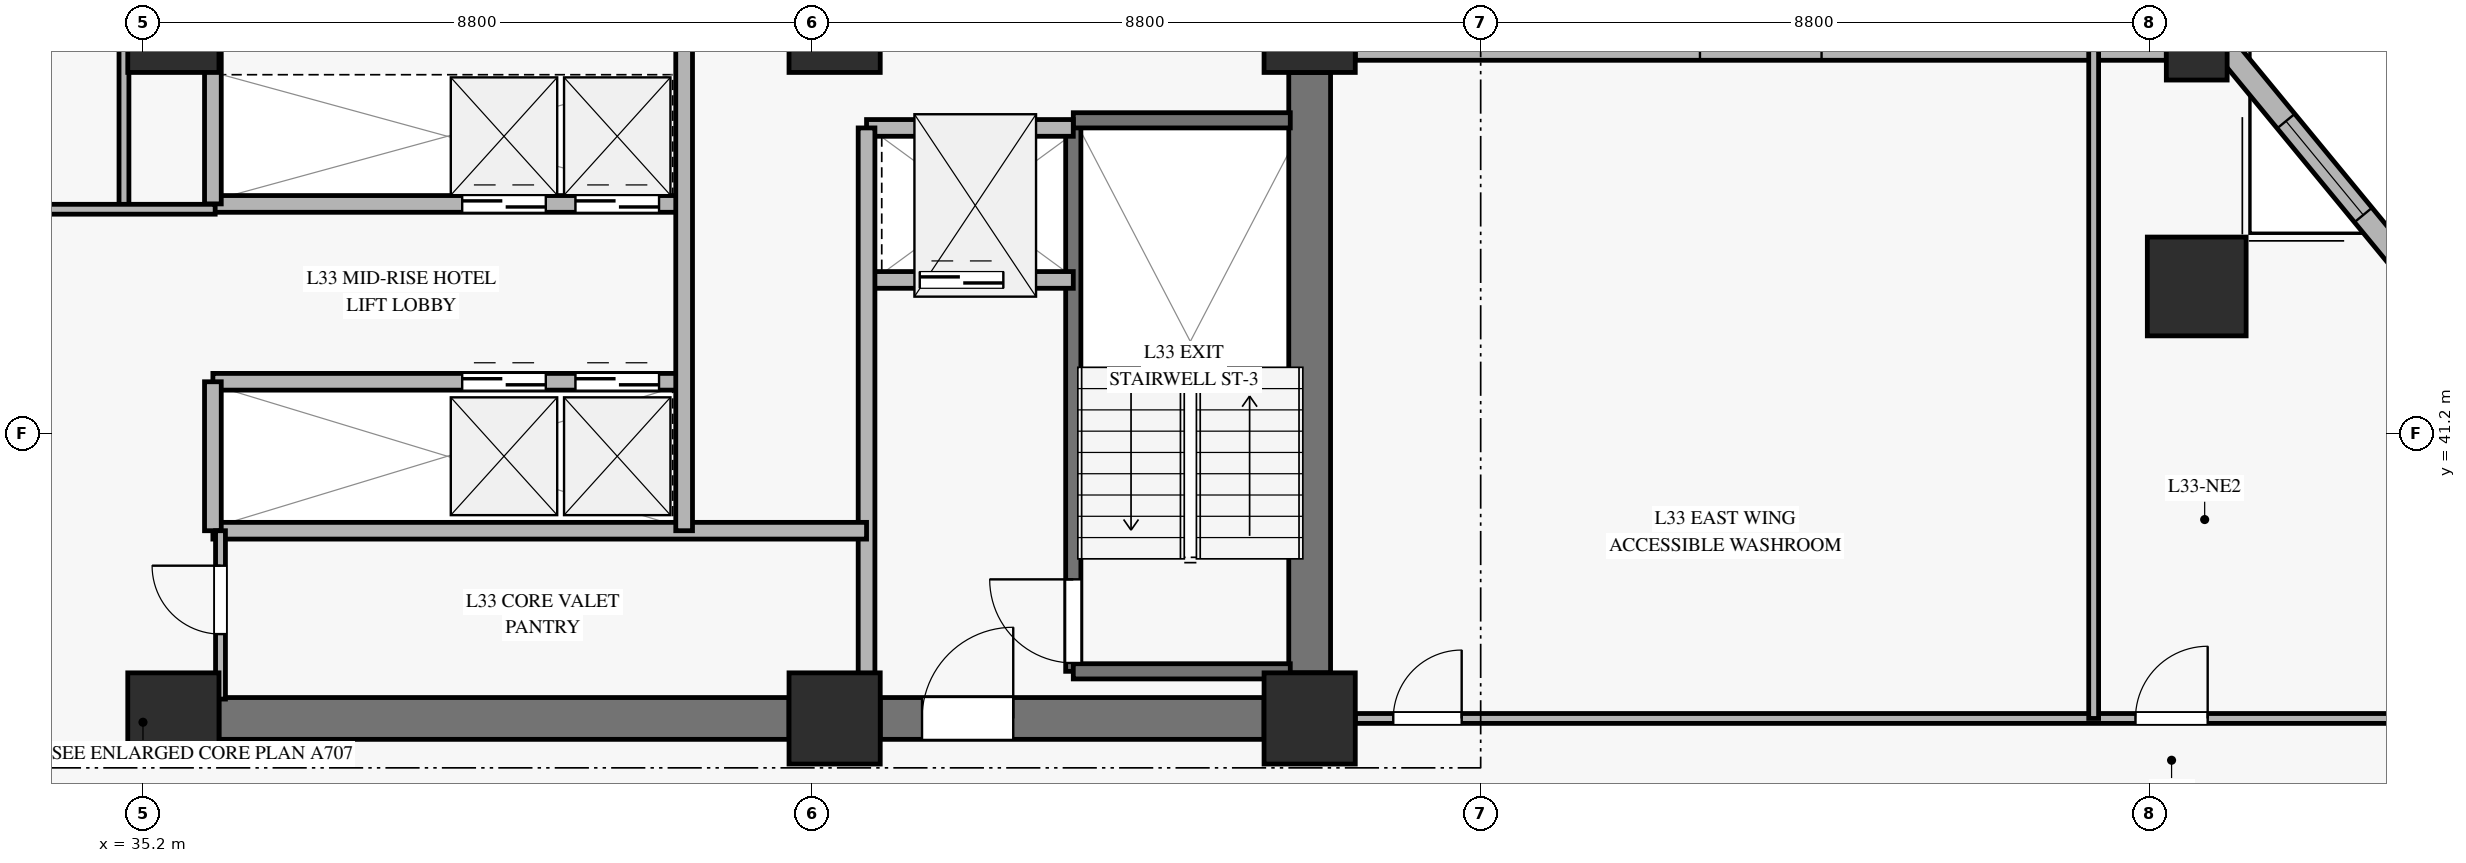
"""IFC4 building model, lengths in metres.
Left out: names, types, materials, properties, quantities, classifications, styles, units other than length and angle.
Written with IfcOpenShell. Run it as: python <this file> out.ifc"""

import sys

from ifc_helpers import new_model, si_unit, direction, frame, frame_2d, origin, origin_2d, place, context, subcontext, project, spatial, rectangle, hollow_rectangle, extrude, source, transform, mapped, element, fill, save


model = new_model("IFC4")
c1 = context("Model", 3, precision=1e-05, world=origin(), true_north=direction((0.0, 1.0)))
c2 = subcontext(c1, "Body", "Model", "MODEL_VIEW")
j1 = project(units=[si_unit("LENGTHUNIT", "METRE"), si_unit("PLANEANGLEUNIT", "RADIAN")], contexts=[c1])
p1 = place(None, origin())
s1 = spatial("IfcSite", under=j1, at=p1, CompositionType="ELEMENT")
p2 = place(p1, origin())
s2 = spatial("IfcBuilding", under=s1, at=p2, CompositionType="ELEMENT")
p3 = place(p2, frame((0.0, 0.0, 137.7)))
s3 = spatial("IfcBuildingStorey", under=s2, at=p3, CompositionType="ELEMENT", Elevation=137.7)
m1 = source(origin(), c2, "Body", "SweptSolid", [
    extrude(rectangle(XDim=1.2, YDim=1.2, at=origin_2d()), origin(), (0.0, 0.0, 1.0), 3.27),
])
for number, where, z_axis, x_axis in (
    (1, (35.6, 37.45, 0.0), (0.0, 0.0, 1.0), (1.0, 0.0, 0.0)),
    (2, (35.6, 46.55, 0.0), (0.0, 0.0, 1.0), (1.0, 0.0, 0.0)),
    (3, (44.3, 37.45, 0.0), (0.0, 0.0, 1.0), (1.0, 0.0, 0.0)),
    (4, (44.3, 46.55, 0.0), (0.0, 0.0, 1.0), (1.0, 0.0, 0.0)),
    (5, (50.55, 37.45, 0.0), (0.0, 0.0, 1.0), (1.0, 0.0, 0.0)),
    (6, (50.55, 46.55, 0.0), (0.0, 0.0, 1.0), (1.0, 0.0, 0.0)),
):
    element("IfcColumn", number, at=place(p3, frame(where, z_axis=z_axis, x_axis=x_axis)), inside=s3, PredefinedType="PILASTER", context=c2, shape_type="MappedRepresentation", body=[
        mapped(m1, transform((0.0, 0.0, 0.0), x_axis=(1.0, 0.0, 0.0), y_axis=(0.0, 1.0, 0.0), z_axis=(0.0, 0.0, 1.0), scale=1.0)),
    ])
p4 = place(p3, frame((36.2, 37.45, 0.0), z_axis=(0.0, 0.0, 1.0), x_axis=(1.0, 0.0, 0.0)))
e7 = element("IfcWall", 7, at=p4, inside=s3, PredefinedType="SHEAR", context=c2, shape_type="SweptSolid", body=[
    extrude(rectangle(XDim=7.5, YDim=0.55, at=frame_2d((3.75, 0.0))), origin(), (0.0, 0.0, 1.0), 3.27),
])
p5 = place(p3, frame((44.9, 37.45, 0.0), z_axis=(0.0, 0.0, 1.0), x_axis=(1.0, 0.0, 0.0)))
e8 = element("IfcWall", 8, at=p5, inside=s3, PredefinedType="SHEAR", context=c2, shape_type="SweptSolid", body=[
    extrude(rectangle(XDim=5.05, YDim=0.55, at=frame_2d((2.525, 0.0))), origin(), (0.0, 0.0, 1.0), 3.27),
])
p6 = place(p5, frame((0.55, 0.0, 0.0)))
e9 = element("IfcOpeningElement", 9, at=p6, cuts=e8, PredefinedType="OPENING", context=c2, shape_type="SweptSolid", body=[
    extrude(rectangle(XDim=1.2, YDim=2.15, at=frame_2d((0.6, 1.075))), frame((0.0, 0.285, 0.0), z_axis=(0.0, -1.0, 0.0), x_axis=(1.0, 0.0, 0.0)), (0.0, 0.0, 1.0), 0.57),
])
p7 = place(p3, frame((50.55, 38.05, 0.0), z_axis=(0.0, 0.0, 1.0), x_axis=(0.0, 1.0, 0.0)))
e10 = element("IfcWall", 10, at=p7, inside=s3, PredefinedType="SHEAR", context=c2, shape_type="SweptSolid", body=[
    extrude(rectangle(XDim=7.9, YDim=0.55, at=frame_2d((3.95, 0.0))), origin(), (0.0, 0.0, 1.0), 3.27),
])
m2 = source(origin(), c2, "Body", "SweptSolid", [
    extrude(hollow_rectangle(XDim=1.3, YDim=1.3, WallThickness=0.06, at=origin_2d()), origin(), (0.0, 0.0, 1.0), 3.27),
])
p8 = place(p3, frame((62.221, 43.134, 0.0), z_axis=(0.0, 0.0, 1.0), x_axis=(1.0, 0.0, 0.0)))
e11 = element("IfcColumn", 11, at=p8, inside=s3, PredefinedType="COLUMN", context=c2, shape_type="MappedRepresentation", body=[
    mapped(m2, transform((0.0, 0.0, 0.0), x_axis=(1.0, 0.0, 0.0), y_axis=(0.0, 1.0, 0.0), z_axis=(0.0, 0.0, 1.0), scale=1.0)),
])
m3 = source(origin(), c2, "Body", "SweptSolid", [
    extrude(hollow_rectangle(XDim=0.8, YDim=0.8, WallThickness=0.036, at=origin_2d()), origin(), (0.0, 0.0, 1.0), 3.27),
])
p9 = place(p3, frame((62.221, 46.25, 0.0), z_axis=(0.0, 0.0, 1.0), x_axis=(1.0, 0.0, 0.0)))
e12 = element("IfcColumn", 12, at=p9, inside=s3, PredefinedType="COLUMN", context=c2, shape_type="MappedRepresentation", body=[
    mapped(m3, transform((0.0, 0.0, 0.0), x_axis=(1.0, 0.0, 0.0), y_axis=(0.0, 1.0, 0.0), z_axis=(0.0, 0.0, 1.0), scale=1.0)),
])
p10 = place(p3, frame((51.15, 46.25, 0.0), z_axis=(0.0, 0.0, 1.0), x_axis=(1.0, 0.0, 0.0)))
e13 = element("IfcWall", 13, at=p10, inside=s3, PredefinedType="SOLIDWALL", context=c2, shape_type="SweptSolid", body=[
    extrude(rectangle(XDim=10.671, YDim=0.28, at=frame_2d((5.335, 0.0))), origin(), (0.0, 0.0, 1.0), 2.75),
])
p11 = place(p10, frame((4.535, 0.0, 0.45)))
e14 = element("IfcOpeningElement", 14, at=p11, cuts=e13, PredefinedType="OPENING", context=c2, shape_type="SweptSolid", body=[
    extrude(rectangle(XDim=1.6, YDim=2.0, at=frame_2d((0.8, 1.0))), frame((0.0, 0.15, 0.0), z_axis=(0.0, -1.0, 0.0), x_axis=(1.0, 0.0, 0.0)), (0.0, 0.0, 1.0), 0.3),
])
p12 = place(p3, frame((65.186, 43.134, 0.0), z_axis=(0.0, 0.0, 1.0), x_axis=(-0.63553760815, 0.772069911748, 0.0)))
e15 = element("IfcWall", 15, at=p12, inside=s3, PredefinedType="SOLIDWALL", context=c2, shape_type="SweptSolid", body=[
    extrude(rectangle(XDim=4.036, YDim=0.3, at=frame_2d((2.018, 0.0))), origin(), (0.0, 0.0, 1.0), 2.75),
])
p13 = place(p12, frame((1.218, 0.0, 0.45)))
e16 = element("IfcOpeningElement", 16, at=p13, cuts=e15, PredefinedType="OPENING", context=c2, shape_type="SweptSolid", body=[
    extrude(rectangle(XDim=1.6, YDim=2.0, at=frame_2d((0.8, 1.0))), frame((0.0, 0.16, 0.0), z_axis=(0.0, -1.0, 0.0), x_axis=(1.0, 0.0, 0.0)), (0.0, 0.0, 1.0), 0.32),
])
p14 = place(p3, frame((47.44, 38.07, 0.0), z_axis=(0.0, 0.0, 1.0), x_axis=(0.0, 1.0, 0.0)))
e17 = element("IfcWall", 17, at=p14, inside=s3, PredefinedType="SOLIDWALL", context=c2, shape_type="SweptSolid", body=[
    extrude(rectangle(XDim=7.25, YDim=0.2, at=frame_2d((3.625, 0.0))), origin(), (0.0, 0.0, 1.0), 3.5),
])
p15 = place(p14, frame((0.11, 0.0, 0.0)))
e18 = element("IfcOpeningElement", 18, at=p15, cuts=e17, PredefinedType="OPENING", context=c2, shape_type="SweptSolid", body=[
    extrude(rectangle(XDim=1.1, YDim=2.15, at=frame_2d((0.55, 1.075))), frame((0.0, 0.11, 0.0), z_axis=(0.0, -1.0, 0.0), x_axis=(1.0, 0.0, 0.0)), (0.0, 0.0, 1.0), 0.22),
])
for number, where, z_axis, x_axis in (
    (19, (47.44, 45.32, 0.0), (0.0, 0.0, 1.0), (1.0, 0.0, 0.0)),
    (20, (47.44, 38.07, 0.0), (0.0, 0.0, 1.0), (1.0, 0.0, 0.0)),
):
    element("IfcWall", number, at=place(p3, frame(where, z_axis=z_axis, x_axis=x_axis)), inside=s3, PredefinedType="SOLIDWALL", context=c2, shape_type="SweptSolid", body=[
        extrude(rectangle(XDim=2.855, YDim=0.2, at=frame_2d((1.427, 0.0))), origin(), (0.0, 0.0, 1.0), 3.5),
    ])
p16 = place(p3, frame((44.72, 43.22, 0.0), z_axis=(0.0, 0.0, 1.0), x_axis=(1.0, 0.0, 0.0)))
e21 = element("IfcWall", 21, at=p16, inside=s3, PredefinedType="SOLIDWALL", context=c2, shape_type="SweptSolid", body=[
    extrude(rectangle(XDim=2.72, YDim=0.22, at=frame_2d((1.36, 0.0))), origin(), (0.0, 0.0, 1.0), 3.27),
])
p17 = place(p16, frame((0.7, 0.0, 0.0)))
e22 = element("IfcOpeningElement", 22, at=p17, cuts=e21, PredefinedType="OPENING", context=c2, shape_type="SweptSolid", body=[
    extrude(rectangle(XDim=1.1, YDim=2.2, at=frame_2d((0.55, 1.1))), frame((0.0, 0.12, 0.0), z_axis=(0.0, -1.0, 0.0), x_axis=(1.0, 0.0, 0.0)), (0.0, 0.0, 1.0), 0.24),
])
p18 = place(p3, frame((44.72, 45.22, 0.0), z_axis=(0.0, 0.0, 1.0), x_axis=(1.0, 0.0, 0.0)))
e23 = element("IfcWall", 23, at=p18, inside=s3, PredefinedType="SOLIDWALL", context=c2, shape_type="SweptSolid", body=[
    extrude(rectangle(XDim=2.72, YDim=0.22, at=frame_2d((1.36, 0.0))), origin(), (0.0, 0.0, 1.0), 3.27),
])
p19 = place(p3, frame((44.72, 37.705, 0.0), z_axis=(0.0, 0.0, 1.0), x_axis=(0.0, 1.0, 0.0)))
e24 = element("IfcWall", 24, at=p19, inside=s3, PredefinedType="SOLIDWALL", context=c2, shape_type="SweptSolid", body=[
    extrude(rectangle(XDim=7.515, YDim=0.22, at=frame_2d((3.757, 0.0))), origin(), (0.0, 0.0, 1.0), 3.27),
])
p20 = place(p3, frame((36.12, 44.22, 0.0), z_axis=(0.0, 0.0, 1.0), x_axis=(1.0, 0.0, 0.0)))
e25 = element("IfcWall", 25, at=p20, inside=s3, PredefinedType="SOLIDWALL", context=c2, shape_type="SweptSolid", body=[
    extrude(rectangle(XDim=6.2, YDim=0.22, at=frame_2d((3.1, 0.0))), origin(), (0.0, 0.0, 1.0), 3.27),
])
p21 = place(p20, frame((3.28, 0.0, 0.0)))
e26 = element("IfcOpeningElement", 26, at=p21, cuts=e25, PredefinedType="OPENING", context=c2, shape_type="SweptSolid", body=[
    extrude(rectangle(XDim=1.1, YDim=2.2, at=frame_2d((0.55, 1.1))), frame((0.0, 0.12, 0.0), z_axis=(0.0, -1.0, 0.0), x_axis=(1.0, 0.0, 0.0)), (0.0, 0.0, 1.0), 0.24),
])
p22 = place(p20, frame((4.77, 0.0, 0.0)))
e27 = element("IfcOpeningElement", 27, at=p22, cuts=e25, PredefinedType="OPENING", context=c2, shape_type="SweptSolid", body=[
    extrude(rectangle(XDim=1.1, YDim=2.2, at=frame_2d((0.55, 1.1))), frame((0.0, 0.12, 0.0), z_axis=(0.0, -1.0, 0.0), x_axis=(1.0, 0.0, 0.0)), (0.0, 0.0, 1.0), 0.24),
])
p23 = place(p3, frame((36.12, 41.88, 0.0), z_axis=(0.0, 0.0, 1.0), x_axis=(1.0, 0.0, 0.0)))
e28 = element("IfcWall", 28, at=p23, inside=s3, PredefinedType="SOLIDWALL", context=c2, shape_type="SweptSolid", body=[
    extrude(rectangle(XDim=6.2, YDim=0.22, at=frame_2d((3.1, 0.0))), origin(), (0.0, 0.0, 1.0), 3.27),
])
p24 = place(p23, frame((3.28, 0.0, 0.0)))
e29 = element("IfcOpeningElement", 29, at=p24, cuts=e28, PredefinedType="OPENING", context=c2, shape_type="SweptSolid", body=[
    extrude(rectangle(XDim=1.1, YDim=2.2, at=frame_2d((0.55, 1.1))), frame((0.0, 0.12, 0.0), z_axis=(0.0, -1.0, 0.0), x_axis=(1.0, 0.0, 0.0)), (0.0, 0.0, 1.0), 0.24),
])
p25 = place(p23, frame((4.77, 0.0, 0.0)))
e30 = element("IfcOpeningElement", 30, at=p25, cuts=e28, PredefinedType="OPENING", context=c2, shape_type="SweptSolid", body=[
    extrude(rectangle(XDim=1.1, YDim=2.2, at=frame_2d((0.55, 1.1))), frame((0.0, 0.12, 0.0), z_axis=(0.0, -1.0, 0.0), x_axis=(1.0, 0.0, 0.0)), (0.0, 0.0, 1.0), 0.24),
])
p26 = place(p3, frame((36.12, 39.92, 0.0), z_axis=(0.0, 0.0, 1.0), x_axis=(1.0, 0.0, 0.0)))
e31 = element("IfcWall", 31, at=p26, inside=s3, PredefinedType="SOLIDWALL", context=c2, shape_type="SweptSolid", body=[
    extrude(rectangle(XDim=8.6, YDim=0.22, at=frame_2d((4.3, 0.0))), origin(), (0.0, 0.0, 1.0), 2.555),
])
p27 = place(p3, frame((42.32, 39.92, 0.0), z_axis=(0.0, 0.0, 1.0), x_axis=(0.0, 1.0, 0.0)))
e32 = element("IfcWall", 32, at=p27, inside=s3, PredefinedType="SOLIDWALL", context=c2, shape_type="SweptSolid", body=[
    extrude(rectangle(XDim=6.375, YDim=0.22, at=frame_2d((3.188, 0.0))), origin(), (0.0, 0.0, 1.0), 3.27),
])
p28 = place(p3, frame((36.12, 39.92, 0.0), z_axis=(0.0, 0.0, 1.0), x_axis=(0.0, 1.0, 0.0)))
e33 = element("IfcWall", 33, at=p28, inside=s3, PredefinedType="SOLIDWALL", context=c2, shape_type="SweptSolid", body=[
    extrude(rectangle(XDim=1.96, YDim=0.22, at=frame_2d((0.98, 0.0))), origin(), (0.0, 0.0, 1.0), 3.27),
])
p29 = place(p3, frame((36.12, 44.22, 0.0), z_axis=(0.0, 0.0, 1.0), x_axis=(0.0, 1.0, 0.0)))
e34 = element("IfcWall", 34, at=p29, inside=s3, PredefinedType="SOLIDWALL", context=c2, shape_type="SweptSolid", body=[
    extrude(rectangle(XDim=2.075, YDim=0.22, at=frame_2d((1.038, 0.0))), origin(), (0.0, 0.0, 1.0), 3.27),
])
p30 = place(p3, frame((34.95, 44.15, 0.0), z_axis=(0.0, 0.0, 1.0), x_axis=(0.0, 1.0, 0.0)))
e35 = element("IfcWall", 35, at=p30, inside=s3, PredefinedType="PARTITIONING", context=c2, shape_type="SweptSolid", body=[
    extrude(rectangle(XDim=2.145, YDim=0.13, at=frame_2d((1.073, 0.0))), origin(), (0.0, 0.0, 1.0), 3.27),
])
p31 = place(p3, frame((33.18, 44.15, 0.0), z_axis=(0.0, 0.0, 1.0), x_axis=(1.0, 0.0, 0.0)))
e36 = element("IfcWall", 36, at=p31, inside=s3, PredefinedType="PARTITIONING", context=c2, shape_type="SweptSolid", body=[
    extrude(rectangle(XDim=2.97, YDim=0.13, at=frame_2d((1.485, 0.0))), origin(), (0.0, 0.0, 1.0), 2.555),
])
p32 = place(p3, frame((36.22, 37.705, 0.0), z_axis=(0.0, 0.0, 1.0), x_axis=(0.0, 1.0, 0.0)))
e37 = element("IfcWall", 37, at=p32, inside=s3, PredefinedType="PARTITIONING", context=c2, shape_type="SweptSolid", body=[
    extrude(rectangle(XDim=2.215, YDim=0.13, at=frame_2d((1.107, 0.0))), origin(), (0.0, 0.0, 1.0), 3.27),
])
p33 = place(p32, frame((0.855, 0.0, 0.0)))
e38 = element("IfcOpeningElement", 38, at=p33, cuts=e37, PredefinedType="OPENING", context=c2, shape_type="SweptSolid", body=[
    extrude(rectangle(XDim=0.9, YDim=2.1, at=frame_2d((0.45, 1.05))), frame((0.0, 0.075, 0.0), z_axis=(0.0, -1.0, 0.0), x_axis=(1.0, 0.0, 0.0)), (0.0, 0.0, 1.0), 0.15),
])
p34 = place(p3, frame((51.15, 37.45, 0.0), z_axis=(0.0, 0.0, 1.0), x_axis=(1.0, 0.0, 0.0)))
e39 = element("IfcWall", 39, at=p34, inside=s3, PredefinedType="PARTITIONING", context=c2, shape_type="SweptSolid", body=[
    extrude(rectangle(XDim=14.036, YDim=0.13, at=frame_2d((7.018, 0.0))), origin(), (0.0, 0.0, 1.0), 2.755),
])
p35 = place(p34, frame((0.5, 0.0, 0.0)))
e40 = element("IfcOpeningElement", 40, at=p35, cuts=e39, PredefinedType="OPENING", context=c2, shape_type="SweptSolid", body=[
    extrude(rectangle(XDim=0.9, YDim=2.1, at=frame_2d((0.45, 1.05))), frame((0.0, 0.075, 0.0), z_axis=(0.0, -1.0, 0.0), x_axis=(1.0, 0.0, 0.0)), (0.0, 0.0, 1.0), 0.15),
])
p36 = place(p34, frame((10.265, 0.0, 0.0)))
e41 = element("IfcOpeningElement", 41, at=p36, cuts=e39, PredefinedType="OPENING", context=c2, shape_type="SweptSolid", body=[
    extrude(rectangle(XDim=0.95, YDim=2.1, at=frame_2d((0.475, 1.05))), frame((0.0, 0.075, 0.0), z_axis=(0.0, -1.0, 0.0), x_axis=(1.0, 0.0, 0.0)), (0.0, 0.0, 1.0), 0.15),
])
p37 = place(p3, frame((60.865, 37.45, 0.0), z_axis=(0.0, 0.0, 1.0), x_axis=(0.0, 1.0, 0.0)))
e42 = element("IfcWall", 42, at=p37, inside=s3, PredefinedType="PARTITIONING", context=c2, shape_type="SweptSolid", body=[
    extrude(rectangle(XDim=8.8, YDim=0.13, at=frame_2d((4.4, 0.0))), origin(), (0.0, 0.0, 1.0), 3.27),
])
m4 = source(origin(), c2, "Body", "SweptSolid", [
    extrude(rectangle(XDim=1.6, YDim=2.0, at=frame_2d((0.8, 1.0))), frame((0.0, 0.03, 0.0), z_axis=(0.0, -1.0, 0.0), x_axis=(1.0, 0.0, 0.0)), (0.0, 0.0, 1.0), 0.06),
])
p38 = place(p13, origin())
e43 = element("IfcWindow", 43, at=p38, inside=s3, PartitioningType="SINGLE_PANEL", PredefinedType="WINDOW", context=c2, shape_type="MappedRepresentation", body=[
    mapped(m4, transform((0.0, 0.0, 0.0), x_axis=(1.0, 0.0, 0.0), y_axis=(0.0, 1.0, 0.0), z_axis=(0.0, 0.0, 1.0), scale=1.0)),
])
fill(e16, e43)
m5 = source(origin(), c2, "Body", "SweptSolid", [
    extrude(rectangle(XDim=1.1, YDim=2.15, at=frame_2d((0.55, 1.075))), frame((0.0, 0.025, 0.0), z_axis=(0.0, -1.0, 0.0), x_axis=(1.0, 0.0, 0.0)), (0.0, 0.0, 1.0), 0.05),
])
p39 = place(p15, origin())
e44 = element("IfcDoor", 44, at=p39, inside=s3, OperationType="SINGLE_SWING_RIGHT", PredefinedType="DOOR", context=c2, shape_type="MappedRepresentation", body=[
    mapped(m5, transform((0.0, 0.0, 0.0), x_axis=(1.0, 0.0, 0.0), y_axis=(0.0, 1.0, 0.0), z_axis=(0.0, 0.0, 1.0), scale=1.0)),
])
fill(e18, e44)
m6 = source(origin(), c2, "Body", "SweptSolid", [
    extrude(rectangle(XDim=1.1, YDim=2.2, at=frame_2d((0.55, 1.1))), frame((0.0, 0.025, 0.0), z_axis=(0.0, -1.0, 0.0), x_axis=(1.0, 0.0, 0.0)), (0.0, 0.0, 1.0), 0.05),
])
p40 = place(p17, origin())
e45 = element("IfcDoor", 45, at=p40, inside=s3, OperationType="SLIDING_TO_LEFT", PredefinedType="DOOR", context=c2, shape_type="MappedRepresentation", body=[
    mapped(m6, transform((0.0, 0.0, 0.0), x_axis=(1.0, 0.0, 0.0), y_axis=(0.0, 1.0, 0.0), z_axis=(0.0, 0.0, 1.0), scale=1.0)),
])
fill(e22, e45)
m7 = source(origin(), c2, "Body", "SweptSolid", [
    extrude(rectangle(XDim=1.2, YDim=2.15, at=frame_2d((0.6, 1.075))), frame((0.0, 0.025, 0.0), z_axis=(0.0, -1.0, 0.0), x_axis=(1.0, 0.0, 0.0)), (0.0, 0.0, 1.0), 0.05),
])
p41 = place(p6, origin())
e46 = element("IfcDoor", 46, at=p41, inside=s3, OperationType="SINGLE_SWING_RIGHT", PredefinedType="DOOR", context=c2, shape_type="MappedRepresentation", body=[
    mapped(m7, transform((0.0, 0.0, 0.0), x_axis=(1.0, 0.0, 0.0), y_axis=(0.0, 1.0, 0.0), z_axis=(0.0, 0.0, 1.0), scale=1.0)),
])
fill(e9, e46)
p42 = place(p21, origin())
e47 = element("IfcDoor", 47, at=p42, inside=s3, OperationType="SLIDING_TO_LEFT", PredefinedType="DOOR", context=c2, shape_type="MappedRepresentation", body=[
    mapped(m6, transform((0.0, 0.0, 0.0), x_axis=(1.0, 0.0, 0.0), y_axis=(0.0, 1.0, 0.0), z_axis=(0.0, 0.0, 1.0), scale=1.0)),
])
fill(e26, e47)
p43 = place(p22, origin())
e48 = element("IfcDoor", 48, at=p43, inside=s3, OperationType="SLIDING_TO_LEFT", PredefinedType="DOOR", context=c2, shape_type="MappedRepresentation", body=[
    mapped(m6, transform((0.0, 0.0, 0.0), x_axis=(1.0, 0.0, 0.0), y_axis=(0.0, 1.0, 0.0), z_axis=(0.0, 0.0, 1.0), scale=1.0)),
])
fill(e27, e48)
p44 = place(p24, origin())
e49 = element("IfcDoor", 49, at=p44, inside=s3, OperationType="SLIDING_TO_LEFT", PredefinedType="DOOR", context=c2, shape_type="MappedRepresentation", body=[
    mapped(m6, transform((0.0, 0.0, 0.0), x_axis=(1.0, 0.0, 0.0), y_axis=(0.0, 1.0, 0.0), z_axis=(0.0, 0.0, 1.0), scale=1.0)),
])
fill(e29, e49)
p45 = place(p25, origin())
e50 = element("IfcDoor", 50, at=p45, inside=s3, OperationType="SLIDING_TO_LEFT", PredefinedType="DOOR", context=c2, shape_type="MappedRepresentation", body=[
    mapped(m6, transform((0.0, 0.0, 0.0), x_axis=(1.0, 0.0, 0.0), y_axis=(0.0, 1.0, 0.0), z_axis=(0.0, 0.0, 1.0), scale=1.0)),
])
fill(e30, e50)
m8 = source(origin(), c2, "Body", "SweptSolid", [
    extrude(rectangle(XDim=0.9, YDim=2.1, at=frame_2d((0.45, 1.05))), frame((0.0, 0.025, 0.0), z_axis=(0.0, -1.0, 0.0), x_axis=(1.0, 0.0, 0.0)), (0.0, 0.0, 1.0), 0.05),
])
p46 = place(p33, origin())
e51 = element("IfcDoor", 51, at=p46, inside=s3, OperationType="SINGLE_SWING_RIGHT", PredefinedType="DOOR", context=c2, shape_type="MappedRepresentation", body=[
    mapped(m8, transform((0.0, 0.0, 0.0), x_axis=(1.0, 0.0, 0.0), y_axis=(0.0, 1.0, 0.0), z_axis=(0.0, 0.0, 1.0), scale=1.0)),
])
fill(e38, e51)
p47 = place(p35, origin())
e52 = element("IfcDoor", 52, at=p47, inside=s3, OperationType="SINGLE_SWING_RIGHT", PredefinedType="DOOR", context=c2, shape_type="MappedRepresentation", body=[
    mapped(m8, transform((0.0, 0.0, 0.0), x_axis=(1.0, 0.0, 0.0), y_axis=(0.0, 1.0, 0.0), z_axis=(0.0, 0.0, 1.0), scale=1.0)),
])
fill(e40, e52)
m9 = source(origin(), c2, "Body", "SweptSolid", [
    extrude(rectangle(XDim=0.95, YDim=2.1, at=frame_2d((0.475, 1.05))), frame((0.0, 0.025, 0.0), z_axis=(0.0, -1.0, 0.0), x_axis=(1.0, 0.0, 0.0)), (0.0, 0.0, 1.0), 0.05),
])
p48 = place(p36, origin())
e53 = element("IfcDoor", 53, at=p48, inside=s3, OperationType="SINGLE_SWING_RIGHT", PredefinedType="DOOR", context=c2, shape_type="MappedRepresentation", body=[
    mapped(m9, transform((0.0, 0.0, 0.0), x_axis=(1.0, 0.0, 0.0), y_axis=(0.0, 1.0, 0.0), z_axis=(0.0, 0.0, 1.0), scale=1.0)),
])
fill(e41, e53)
save(model, sys.argv[1])
